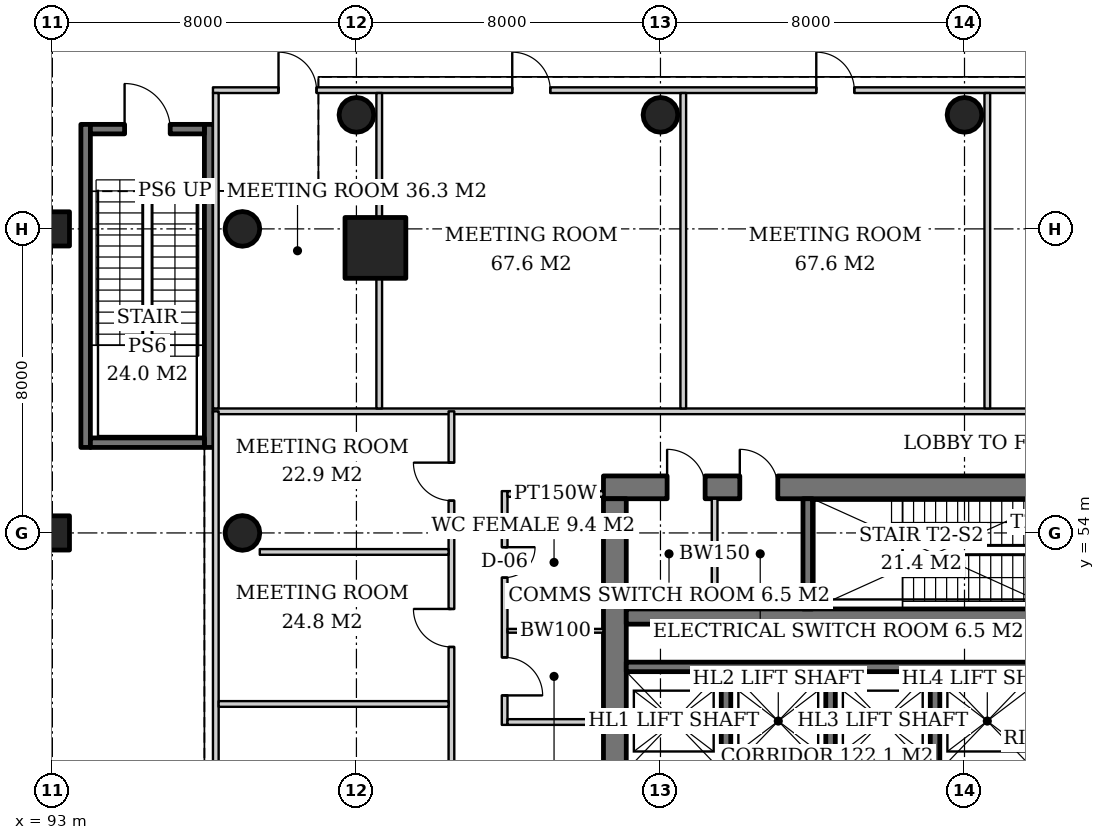
"""IFC4 building model, lengths in metres.
Left out: names, types, materials, properties, quantities, classifications, styles, units other than length and angle.
Written with IfcOpenShell. Run it as: python <this file> out.ifc"""

import sys

from ifc_helpers import new_model, si_unit, direction, frame, frame_2d, origin, origin_2d, place, context, subcontext, project, spatial, rectangle, hollow_circle, extrude, element, fill, save


model = new_model("IFC4")
c1 = context("Model", 3, precision=1e-05, world=origin(), true_north=direction((0.0, 1.0)))
c2 = subcontext(c1, "Body", "Model", "MODEL_VIEW")
j1 = project(units=[si_unit("LENGTHUNIT", "METRE"), si_unit("PLANEANGLEUNIT", "RADIAN")], contexts=[c1])
p1 = place(None, origin())
s1 = spatial("IfcSite", under=j1, at=p1, CompositionType="ELEMENT")
p2 = place(p1, origin())
s2 = spatial("IfcBuilding", under=s1, at=p2, CompositionType="ELEMENT")
p3 = place(p2, frame((0.0, 0.0, 11.0)))
s3 = spatial("IfcBuildingStorey", under=s2, at=p3, CompositionType="ELEMENT", Elevation=11.0)
for number, where, z_axis, x_axis in (
    (1, (93.0, 54.0, 0.0), (0.0, 0.0, 1.0), (1.0, 0.0, 0.0)),
    (2, (93.0, 62.0, 0.0), (0.0, 0.0, 1.0), (1.0, 0.0, 0.0)),
):
    element("IfcColumn", number, at=place(p3, frame(where, z_axis=z_axis, x_axis=x_axis)), inside=s3, PredefinedType="COLUMN", context=c2, shape_type="SweptSolid", body=[
        extrude(rectangle(XDim=0.9, YDim=0.9, at=origin_2d()), origin(), (0.0, 0.0, 1.0), 5.0),
    ])
p4 = place(p3, frame((101.5, 61.5, 0.0), z_axis=(0.0, 0.0, 1.0), x_axis=(1.0, 0.0, 0.0)))
e3 = element("IfcColumn", 3, at=p4, inside=s3, PredefinedType="COLUMN", context=c2, shape_type="SweptSolid", body=[
    extrude(rectangle(XDim=1.6, YDim=1.6, at=origin_2d()), origin(), (0.0, 0.0, 1.0), 5.0),
])
for number, where, z_axis, x_axis in (
    (4, (101.0, 65.0, 0.0), (0.0, 0.0, 1.0), (1.0, 0.0, 0.0)),
    (5, (117.0, 65.0, 0.0), (0.0, 0.0, 1.0), (1.0, 0.0, 0.0)),
    (6, (109.0, 65.0, 0.0), (0.0, 0.0, 1.0), (1.0, 0.0, 0.0)),
    (7, (98.0, 62.0, 0.0), (0.0, 0.0, 1.0), (1.0, 0.0, 0.0)),
    (8, (98.0, 54.0, 0.0), (0.0, 0.0, 1.0), (1.0, 0.0, 0.0)),
):
    element("IfcColumn", number, at=place(p3, frame(where, z_axis=z_axis, x_axis=x_axis)), inside=s3, PredefinedType="COLUMN", context=c2, shape_type="SweptSolid", body=[
        extrude(hollow_circle(Radius=0.457, WallThickness=0.03, at=origin_2d()), origin(), (0.0, 0.0, 1.0), 5.0),
    ])
p5 = place(p3, frame((107.5, 55.2, 0.0), z_axis=(0.0, 0.0, 1.0), x_axis=(1.0, 0.0, 0.0)))
e9 = element("IfcWall", 9, at=p5, inside=s3, PredefinedType="SHEAR", context=c2, shape_type="SweptSolid", body=[
    extrude(rectangle(XDim=19.0, YDim=0.6, at=frame_2d((9.5, 0.0))), origin(), (0.0, 0.0, 1.0), 5.0),
])
p6 = place(p5, frame((14.14, 0.0, 0.0)))
e10 = element("IfcOpeningElement", 10, at=p6, cuts=e9, PredefinedType="OPENING", context=c2, shape_type="SweptSolid", body=[
    extrude(rectangle(XDim=1.0, YDim=2.1, at=frame_2d((0.5, 1.05))), frame((0.0, 0.31, 0.0), z_axis=(0.0, -1.0, 0.0), x_axis=(1.0, 0.0, 0.0)), (0.0, 0.0, 1.0), 0.62),
])
p7 = place(p5, frame((1.675, 0.0, 0.0)))
e11 = element("IfcOpeningElement", 11, at=p7, cuts=e9, PredefinedType="OPENING", context=c2, shape_type="SweptSolid", body=[
    extrude(rectangle(XDim=1.0, YDim=2.1, at=frame_2d((0.5, 1.05))), frame((0.0, 0.31, 0.0), z_axis=(0.0, -1.0, 0.0), x_axis=(1.0, 0.0, 0.0)), (0.0, 0.0, 1.0), 0.62),
])
p8 = place(p5, frame((3.587, 0.0, 0.0)))
e12 = element("IfcOpeningElement", 12, at=p8, cuts=e9, PredefinedType="OPENING", context=c2, shape_type="SweptSolid", body=[
    extrude(rectangle(XDim=1.0, YDim=2.1, at=frame_2d((0.5, 1.05))), frame((0.0, 0.31, 0.0), z_axis=(0.0, -1.0, 0.0), x_axis=(1.0, 0.0, 0.0)), (0.0, 0.0, 1.0), 0.62),
])
p9 = place(p3, frame((107.8, 37.1, 0.0), z_axis=(0.0, 0.0, 1.0), x_axis=(0.0, 1.0, 0.0)))
e13 = element("IfcWall", 13, at=p9, inside=s3, PredefinedType="SHEAR", context=c2, shape_type="SweptSolid", body=[
    extrude(rectangle(XDim=17.8, YDim=0.6, at=frame_2d((8.9, 0.0))), origin(), (0.0, 0.0, 1.0), 5.0),
])
p10 = place(p9, frame((8.0, 0.0, 0.0)))
e14 = element("IfcOpeningElement", 14, at=p10, cuts=e13, PredefinedType="OPENING", context=c2, shape_type="SweptSolid", body=[
    extrude(rectangle(XDim=1.8, YDim=2.4, at=frame_2d((0.9, 1.2))), frame((0.0, 0.31, 0.0), z_axis=(0.0, -1.0, 0.0), x_axis=(1.0, 0.0, 0.0)), (0.0, 0.0, 1.0), 0.62),
])
p11 = place(p3, frame((108.1, 51.8, 0.0), z_axis=(0.0, 0.0, 1.0), x_axis=(1.0, 0.0, 0.0)))
e15 = element("IfcWall", 15, at=p11, inside=s3, PredefinedType="SHEAR", context=c2, shape_type="SweptSolid", body=[
    extrude(rectangle(XDim=17.8, YDim=0.4, at=frame_2d((8.9, 0.0))), origin(), (0.0, 0.0, 1.0), 5.0),
])
p12 = place(p3, frame((112.875, 52.0, 0.0), z_axis=(0.0, 0.0, 1.0), x_axis=(0.0, 1.0, 0.0)))
e16 = element("IfcWall", 16, at=p12, inside=s3, PredefinedType="SHEAR", context=c2, shape_type="SweptSolid", body=[
    extrude(rectangle(XDim=2.9, YDim=0.25, at=frame_2d((1.45, 0.0))), origin(), (0.0, 0.0, 1.0), 5.0),
])
for number, where, z_axis, x_axis in (
    (17, (110.725, 47.75, 0.0), (0.0, 0.0, 1.0), (0.0, 1.0, 0.0)),
    (18, (113.475, 47.75, 0.0), (0.0, 0.0, 1.0), (0.0, 1.0, 0.0)),
    (19, (116.225, 47.75, 0.0), (0.0, 0.0, 1.0), (0.0, 1.0, 0.0)),
):
    element("IfcWall", number, at=place(p3, frame(where, z_axis=z_axis, x_axis=x_axis)), inside=s3, PredefinedType="SHEAR", context=c2, shape_type="SweptSolid", body=[
        extrude(rectangle(XDim=2.6, YDim=0.25, at=frame_2d((1.3, 0.0))), origin(), (0.0, 0.0, 1.0), 5.0),
    ])
p13 = place(p3, frame((108.1, 50.475, 0.0), z_axis=(0.0, 0.0, 1.0), x_axis=(1.0, 0.0, 0.0)))
e20 = element("IfcWall", 20, at=p13, inside=s3, PredefinedType="SHEAR", context=c2, shape_type="SweptSolid", body=[
    extrude(rectangle(XDim=11.0, YDim=0.25, at=frame_2d((5.5, 0.0))), origin(), (0.0, 0.0, 1.0), 5.0),
])
p14 = place(p3, frame((110.425, 52.0, 0.0), z_axis=(0.0, 0.0, 1.0), x_axis=(0.0, 1.0, 0.0)))
e21 = element("IfcWall", 21, at=p14, inside=s3, PredefinedType="SOLIDWALL", context=c2, shape_type="SweptSolid", body=[
    extrude(rectangle(XDim=2.9, YDim=0.15, at=frame_2d((1.45, 0.0))), origin(), (0.0, 0.0, 1.0), 4.7),
])
for number, where, z_axis, x_axis in (
    (22, (93.875, 56.25, 0.0), (0.0, 0.0, 1.0), (0.0, 1.0, 0.0)),
    (23, (97.125, 56.25, 0.0), (0.0, 0.0, 1.0), (0.0, 1.0, 0.0)),
):
    element("IfcWall", number, at=place(p3, frame(where, z_axis=z_axis, x_axis=x_axis)), inside=s3, PredefinedType="SOLIDWALL", context=c2, shape_type="SweptSolid", body=[
        extrude(rectangle(XDim=8.5, YDim=0.25, at=frame_2d((4.25, 0.0))), origin(), (0.0, 0.0, 1.0), 4.7),
    ])
p15 = place(p3, frame((94.0, 56.375, 0.0), z_axis=(0.0, 0.0, 1.0), x_axis=(1.0, 0.0, 0.0)))
e24 = element("IfcWall", 24, at=p15, inside=s3, PredefinedType="SOLIDWALL", context=c2, shape_type="SweptSolid", body=[
    extrude(rectangle(XDim=3.0, YDim=0.25, at=frame_2d((1.5, 0.0))), origin(), (0.0, 0.0, 1.0), 4.7),
])
p16 = place(p3, frame((94.0, 64.625, 0.0), z_axis=(0.0, 0.0, 1.0), x_axis=(1.0, 0.0, 0.0)))
e25 = element("IfcWall", 25, at=p16, inside=s3, PredefinedType="SOLIDWALL", context=c2, shape_type="SweptSolid", body=[
    extrude(rectangle(XDim=3.0, YDim=0.25, at=frame_2d((1.5, 0.0))), origin(), (0.0, 0.0, 1.0), 4.7),
])
p17 = place(p16, frame((0.9, 0.0, 0.0)))
e26 = element("IfcOpeningElement", 26, at=p17, cuts=e25, PredefinedType="OPENING", context=c2, shape_type="SweptSolid", body=[
    extrude(rectangle(XDim=1.2, YDim=2.1, at=frame_2d((0.6, 1.05))), frame((0.0, 0.135, 0.0), z_axis=(0.0, -1.0, 0.0), x_axis=(1.0, 0.0, 0.0)), (0.0, 0.0, 1.0), 0.27),
])
p18 = place(p3, frame((104.9, 55.1, 0.0), z_axis=(0.0, 0.0, 1.0), x_axis=(0.0, -1.0, 0.0)))
e27 = element("IfcWall", 27, at=p18, inside=s3, PredefinedType="PARTITIONING", context=c2, shape_type="SweptSolid", body=[
    extrude(rectangle(XDim=6.15, YDim=0.15, at=frame_2d((3.075, 0.0))), origin(), (0.0, 0.0, 1.0), 3.9),
])
p19 = place(p18, frame((1.475, 0.0, 0.0)))
e28 = element("IfcOpeningElement", 28, at=p19, cuts=e27, PredefinedType="OPENING", context=c2, shape_type="SweptSolid", body=[
    extrude(rectangle(XDim=0.8, YDim=2.1, at=frame_2d((0.4, 1.05))), frame((0.0, 0.085, 0.0), z_axis=(0.0, -1.0, 0.0), x_axis=(1.0, 0.0, 0.0)), (0.0, 0.0, 1.0), 0.17),
])
p20 = place(p18, frame((4.375, 0.0, 0.0)))
e29 = element("IfcOpeningElement", 29, at=p20, cuts=e27, PredefinedType="OPENING", context=c2, shape_type="SweptSolid", body=[
    extrude(rectangle(XDim=1.0, YDim=2.1, at=frame_2d((0.5, 1.05))), frame((0.0, 0.085, 0.0), z_axis=(0.0, -1.0, 0.0), x_axis=(1.0, 0.0, 0.0)), (0.0, 0.0, 1.0), 0.17),
])
p21 = place(p3, frame((104.975, 55.025, 0.0), z_axis=(0.0, 0.0, 1.0), x_axis=(1.0, 0.0, 0.0)))
e30 = element("IfcWall", 30, at=p21, inside=s3, PredefinedType="PARTITIONING", context=c2, shape_type="SweptSolid", body=[
    extrude(rectangle(XDim=2.525, YDim=0.15, at=frame_2d((1.262, 0.0))), origin(), (0.0, 0.0, 1.0), 3.9),
])
p22 = place(p3, frame((104.975, 51.425, 0.0), z_axis=(0.0, 0.0, 1.0), x_axis=(1.0, 0.0, 0.0)))
e31 = element("IfcWall", 31, at=p22, inside=s3, PredefinedType="SOLIDWALL", context=c2, shape_type="SweptSolid", body=[
    extrude(rectangle(XDim=2.525, YDim=0.1, at=frame_2d((1.262, 0.0))), origin(), (0.0, 0.0, 1.0), 4.7),
])
p23 = place(p3, frame((104.975, 49.025, 0.0), z_axis=(0.0, 0.0, 1.0), x_axis=(1.0, 0.0, 0.0)))
e32 = element("IfcWall", 32, at=p23, inside=s3, PredefinedType="PARTITIONING", context=c2, shape_type="SweptSolid", body=[
    extrude(rectangle(XDim=2.525, YDim=0.15, at=frame_2d((1.262, 0.0))), origin(), (0.0, 0.0, 1.0), 4.7),
])
p24 = place(p3, frame((97.225, 57.2, 0.0), z_axis=(0.0, 0.0, 1.0), x_axis=(1.0, 0.0, 0.0)))
e33 = element("IfcWall", 33, at=p24, inside=s3, PredefinedType="PARTITIONING", context=c2, shape_type="SweptSolid", body=[
    extrude(rectangle(XDim=39.55, YDim=0.15, at=frame_2d((19.775, 0.0))), origin(), (0.0, 0.0, 1.0), 3.9),
])
p25 = place(p3, frame((97.225, 65.65, 0.0), z_axis=(0.0, 0.0, 1.0), x_axis=(1.0, 0.0, 0.0)))
e34 = element("IfcWall", 34, at=p25, inside=s3, PredefinedType="PARTITIONING", context=c2, shape_type="SweptSolid", body=[
    extrude(rectangle(XDim=39.55, YDim=0.15, at=frame_2d((19.775, 0.0))), origin(), (0.0, 0.0, 1.0), 3.2),
])
p26 = place(p25, frame((1.725, 0.0, 0.0)))
e35 = element("IfcOpeningElement", 35, at=p26, cuts=e34, PredefinedType="OPENING", context=c2, shape_type="SweptSolid", body=[
    extrude(rectangle(XDim=1.0, YDim=2.1, at=frame_2d((0.5, 1.05))), frame((0.0, 0.085, 0.0), z_axis=(0.0, -1.0, 0.0), x_axis=(1.0, 0.0, 0.0)), (0.0, 0.0, 1.0), 0.17),
])
p27 = place(p25, frame((7.875, 0.0, 0.0)))
e36 = element("IfcOpeningElement", 36, at=p27, cuts=e34, PredefinedType="OPENING", context=c2, shape_type="SweptSolid", body=[
    extrude(rectangle(XDim=1.0, YDim=2.1, at=frame_2d((0.5, 1.05))), frame((0.0, 0.085, 0.0), z_axis=(0.0, -1.0, 0.0), x_axis=(1.0, 0.0, 0.0)), (0.0, 0.0, 1.0), 0.17),
])
p28 = place(p25, frame((15.875, 0.0, 0.0)))
e37 = element("IfcOpeningElement", 37, at=p28, cuts=e34, PredefinedType="OPENING", context=c2, shape_type="SweptSolid", body=[
    extrude(rectangle(XDim=1.0, YDim=2.1, at=frame_2d((0.5, 1.05))), frame((0.0, 0.085, 0.0), z_axis=(0.0, -1.0, 0.0), x_axis=(1.0, 0.0, 0.0)), (0.0, 0.0, 1.0), 0.17),
])
p29 = place(p25, frame((23.875, 0.0, 0.0)))
e38 = element("IfcOpeningElement", 38, at=p29, cuts=e34, PredefinedType="OPENING", context=c2, shape_type="SweptSolid", body=[
    extrude(rectangle(XDim=1.0, YDim=2.1, at=frame_2d((0.5, 1.05))), frame((0.0, 0.085, 0.0), z_axis=(0.0, -1.0, 0.0), x_axis=(1.0, 0.0, 0.0)), (0.0, 0.0, 1.0), 0.17),
])
p30 = place(p25, frame((31.875, 0.0, 0.0)))
e39 = element("IfcOpeningElement", 39, at=p30, cuts=e34, PredefinedType="OPENING", context=c2, shape_type="SweptSolid", body=[
    extrude(rectangle(XDim=1.0, YDim=2.1, at=frame_2d((0.5, 1.05))), frame((0.0, 0.085, 0.0), z_axis=(0.0, -1.0, 0.0), x_axis=(1.0, 0.0, 0.0)), (0.0, 0.0, 1.0), 0.17),
])
p31 = place(p25, frame((37.425, 0.0, 0.0)))
e40 = element("IfcOpeningElement", 40, at=p31, cuts=e34, PredefinedType="OPENING", context=c2, shape_type="SweptSolid", body=[
    extrude(rectangle(XDim=1.0, YDim=2.1, at=frame_2d((0.5, 1.05))), frame((0.0, 0.085, 0.0), z_axis=(0.0, -1.0, 0.0), x_axis=(1.0, 0.0, 0.0)), (0.0, 0.0, 1.0), 0.17),
])
p32 = place(p3, frame((97.3, 57.275, 0.0), z_axis=(0.0, 0.0, 1.0), x_axis=(0.0, 1.0, 0.0)))
e41 = element("IfcWall", 41, at=p32, inside=s3, PredefinedType="PARTITIONING", context=c2, shape_type="SweptSolid", body=[
    extrude(rectangle(XDim=8.3, YDim=0.15, at=frame_2d((4.15, 0.0))), origin(), (0.0, 0.0, 1.0), 4.7),
])
p33 = place(p3, frame((101.6, 57.275, 0.0), z_axis=(0.0, 0.0, 1.0), x_axis=(0.0, 1.0, 0.0)))
e42 = element("IfcWall", 42, at=p33, inside=s3, PredefinedType="PARTITIONING", context=c2, shape_type="SweptSolid", body=[
    extrude(rectangle(XDim=3.425, YDim=0.15, at=frame_2d((1.712, 0.0))), origin(), (0.0, 0.0, 1.0), 4.7),
])
p34 = place(p3, frame((101.6, 62.3, 0.0), z_axis=(0.0, 0.0, 1.0), x_axis=(0.0, 1.0, 0.0)))
e43 = element("IfcWall", 43, at=p34, inside=s3, PredefinedType="PARTITIONING", context=c2, shape_type="SweptSolid", body=[
    extrude(rectangle(XDim=3.275, YDim=0.15, at=frame_2d((1.637, 0.0))), origin(), (0.0, 0.0, 1.0), 4.15),
])
for number, where, z_axis, x_axis in (
    (44, (109.6, 57.275, 0.0), (0.0, 0.0, 1.0), (0.0, 1.0, 0.0)),
    (45, (117.6, 57.275, 0.0), (0.0, 0.0, 1.0), (0.0, 1.0, 0.0)),
):
    element("IfcWall", number, at=place(p3, frame(where, z_axis=z_axis, x_axis=x_axis)), inside=s3, PredefinedType="PARTITIONING", context=c2, shape_type="SweptSolid", body=[
        extrude(rectangle(XDim=8.3, YDim=0.15, at=frame_2d((4.15, 0.0))), origin(), (0.0, 0.0, 1.0), 4.15),
    ])
p35 = place(p3, frame((97.3, 36.725, 0.0), z_axis=(0.0, 0.0, 1.0), x_axis=(0.0, 1.0, 0.0)))
e46 = element("IfcWall", 46, at=p35, inside=s3, PredefinedType="PARTITIONING", context=c2, shape_type="SweptSolid", body=[
    extrude(rectangle(XDim=20.475, YDim=0.15, at=frame_2d((10.237, 0.0))), origin(), (0.0, 0.0, 1.0), 4.7),
])
p36 = place(p3, frame((103.5, 36.725, 0.0), z_axis=(0.0, 0.0, 1.0), x_axis=(0.0, 1.0, 0.0)))
e47 = element("IfcWall", 47, at=p36, inside=s3, PredefinedType="PARTITIONING", context=c2, shape_type="SweptSolid", body=[
    extrude(rectangle(XDim=20.475, YDim=0.15, at=frame_2d((10.237, 0.0))), origin(), (0.0, 0.0, 1.0), 3.9),
])
p37 = place(p36, frame((1.425, 0.0, 0.0)))
e48 = element("IfcOpeningElement", 48, at=p37, cuts=e47, PredefinedType="OPENING", context=c2, shape_type="SweptSolid", body=[
    extrude(rectangle(XDim=1.0, YDim=2.1, at=frame_2d((0.5, 1.05))), frame((0.0, 0.085, 0.0), z_axis=(0.0, -1.0, 0.0), x_axis=(1.0, 0.0, 0.0)), (0.0, 0.0, 1.0), 0.17),
])
p38 = place(p36, frame((5.275, 0.0, 0.0)))
e49 = element("IfcOpeningElement", 49, at=p38, cuts=e47, PredefinedType="OPENING", context=c2, shape_type="SweptSolid", body=[
    extrude(rectangle(XDim=1.0, YDim=2.1, at=frame_2d((0.5, 1.05))), frame((0.0, 0.085, 0.0), z_axis=(0.0, -1.0, 0.0), x_axis=(1.0, 0.0, 0.0)), (0.0, 0.0, 1.0), 0.17),
])
p39 = place(p36, frame((9.775, 0.0, 0.0)))
e50 = element("IfcOpeningElement", 50, at=p39, cuts=e47, PredefinedType="OPENING", context=c2, shape_type="SweptSolid", body=[
    extrude(rectangle(XDim=1.0, YDim=2.1, at=frame_2d((0.5, 1.05))), frame((0.0, 0.085, 0.0), z_axis=(0.0, -1.0, 0.0), x_axis=(1.0, 0.0, 0.0)), (0.0, 0.0, 1.0), 0.17),
])
p40 = place(p36, frame((14.275, 0.0, 0.0)))
e51 = element("IfcOpeningElement", 51, at=p40, cuts=e47, PredefinedType="OPENING", context=c2, shape_type="SweptSolid", body=[
    extrude(rectangle(XDim=1.0, YDim=2.1, at=frame_2d((0.5, 1.05))), frame((0.0, 0.085, 0.0), z_axis=(0.0, -1.0, 0.0), x_axis=(1.0, 0.0, 0.0)), (0.0, 0.0, 1.0), 0.17),
])
p41 = place(p36, frame((18.125, 0.0, 0.0)))
e52 = element("IfcOpeningElement", 52, at=p41, cuts=e47, PredefinedType="OPENING", context=c2, shape_type="SweptSolid", body=[
    extrude(rectangle(XDim=1.0, YDim=2.1, at=frame_2d((0.5, 1.05))), frame((0.0, 0.085, 0.0), z_axis=(0.0, -1.0, 0.0), x_axis=(1.0, 0.0, 0.0)), (0.0, 0.0, 1.0), 0.17),
])
p42 = place(p3, frame((97.375, 49.5, 0.0), z_axis=(0.0, 0.0, 1.0), x_axis=(1.0, 0.0, 0.0)))
e53 = element("IfcWall", 53, at=p42, inside=s3, PredefinedType="PARTITIONING", context=c2, shape_type="SweptSolid", body=[
    extrude(rectangle(XDim=6.05, YDim=0.15, at=frame_2d((3.025, 0.0))), origin(), (0.0, 0.0, 1.0), 4.15),
])
p43 = place(p3, frame((98.457, 53.5, 0.0), z_axis=(0.0, 0.0, 1.0), x_axis=(1.0, 0.0, 0.0)))
e54 = element("IfcWall", 54, at=p43, inside=s3, PredefinedType="PARTITIONING", context=c2, shape_type="SweptSolid", body=[
    extrude(rectangle(XDim=4.968, YDim=0.15, at=frame_2d((2.484, 0.0))), origin(), (0.0, 0.0, 1.0), 4.7),
])
p44 = place(p7, origin())
e55 = element("IfcDoor", 55, at=p44, inside=s3, OperationType="SINGLE_SWING_LEFT", PredefinedType="DOOR", context=c2, shape_type="SweptSolid", body=[
    extrude(rectangle(XDim=1.0, YDim=2.1, at=frame_2d((0.5, 1.05))), frame((0.0, -0.24, 0.0), z_axis=(0.0, -1.0, 0.0), x_axis=(1.0, 0.0, 0.0)), (0.0, 0.0, 1.0), 0.05),
])
fill(e11, e55)
p45 = place(p8, origin())
e56 = element("IfcDoor", 56, at=p45, inside=s3, OperationType="SINGLE_SWING_LEFT", PredefinedType="DOOR", context=c2, shape_type="SweptSolid", body=[
    extrude(rectangle(XDim=1.0, YDim=2.1, at=frame_2d((0.5, 1.05))), frame((0.0, -0.24, 0.0), z_axis=(0.0, -1.0, 0.0), x_axis=(1.0, 0.0, 0.0)), (0.0, 0.0, 1.0), 0.05),
])
fill(e12, e56)
p46 = place(p17, origin())
e57 = element("IfcDoor", 57, at=p46, inside=s3, OperationType="SINGLE_SWING_LEFT", PredefinedType="DOOR", context=c2, shape_type="SweptSolid", body=[
    extrude(rectangle(XDim=1.2, YDim=2.1, at=frame_2d((0.6, 1.05))), frame((0.0, 0.025, 0.0), z_axis=(0.0, -1.0, 0.0), x_axis=(1.0, 0.0, 0.0)), (0.0, 0.0, 1.0), 0.05),
])
fill(e26, e57)
p47 = place(p19, origin())
e58 = element("IfcDoor", 58, at=p47, inside=s3, OperationType="SINGLE_SWING_LEFT", PredefinedType="DOOR", context=c2, shape_type="SweptSolid", body=[
    extrude(rectangle(XDim=0.8, YDim=2.1, at=frame_2d((0.4, 1.05))), frame((0.0, 0.025, 0.0), z_axis=(0.0, -1.0, 0.0), x_axis=(1.0, 0.0, 0.0)), (0.0, 0.0, 1.0), 0.05),
])
fill(e28, e58)
p48 = place(p20, origin())
e59 = element("IfcDoor", 59, at=p48, inside=s3, OperationType="SINGLE_SWING_RIGHT", PredefinedType="DOOR", context=c2, shape_type="SweptSolid", body=[
    extrude(rectangle(XDim=1.0, YDim=2.1, at=frame_2d((0.5, 1.05))), frame((0.0, 0.025, 0.0), z_axis=(0.0, -1.0, 0.0), x_axis=(1.0, 0.0, 0.0)), (0.0, 0.0, 1.0), 0.05),
])
fill(e29, e59)
p49 = place(p26, origin())
e60 = element("IfcDoor", 60, at=p49, inside=s3, OperationType="SINGLE_SWING_LEFT", PredefinedType="DOOR", context=c2, shape_type="SweptSolid", body=[
    extrude(rectangle(XDim=1.0, YDim=2.1, at=frame_2d((0.5, 1.05))), frame((0.0, 0.025, 0.0), z_axis=(0.0, -1.0, 0.0), x_axis=(1.0, 0.0, 0.0)), (0.0, 0.0, 1.0), 0.05),
])
fill(e35, e60)
p50 = place(p27, origin())
e61 = element("IfcDoor", 61, at=p50, inside=s3, OperationType="SINGLE_SWING_LEFT", PredefinedType="DOOR", context=c2, shape_type="SweptSolid", body=[
    extrude(rectangle(XDim=1.0, YDim=2.1, at=frame_2d((0.5, 1.05))), frame((0.0, 0.025, 0.0), z_axis=(0.0, -1.0, 0.0), x_axis=(1.0, 0.0, 0.0)), (0.0, 0.0, 1.0), 0.05),
])
fill(e36, e61)
p51 = place(p28, origin())
e62 = element("IfcDoor", 62, at=p51, inside=s3, OperationType="SINGLE_SWING_LEFT", PredefinedType="DOOR", context=c2, shape_type="SweptSolid", body=[
    extrude(rectangle(XDim=1.0, YDim=2.1, at=frame_2d((0.5, 1.05))), frame((0.0, 0.025, 0.0), z_axis=(0.0, -1.0, 0.0), x_axis=(1.0, 0.0, 0.0)), (0.0, 0.0, 1.0), 0.05),
])
fill(e37, e62)
p52 = place(p40, origin())
e63 = element("IfcDoor", 63, at=p52, inside=s3, OperationType="SINGLE_SWING_RIGHT", PredefinedType="DOOR", context=c2, shape_type="SweptSolid", body=[
    extrude(rectangle(XDim=1.0, YDim=2.1, at=frame_2d((0.5, 1.05))), frame((0.0, 0.025, 0.0), z_axis=(0.0, -1.0, 0.0), x_axis=(1.0, 0.0, 0.0)), (0.0, 0.0, 1.0), 0.05),
])
fill(e51, e63)
p53 = place(p41, origin())
e64 = element("IfcDoor", 64, at=p53, inside=s3, OperationType="SINGLE_SWING_RIGHT", PredefinedType="DOOR", context=c2, shape_type="SweptSolid", body=[
    extrude(rectangle(XDim=1.0, YDim=2.1, at=frame_2d((0.5, 1.05))), frame((0.0, 0.025, 0.0), z_axis=(0.0, -1.0, 0.0), x_axis=(1.0, 0.0, 0.0)), (0.0, 0.0, 1.0), 0.05),
])
fill(e52, e64)
save(model, sys.argv[1])
